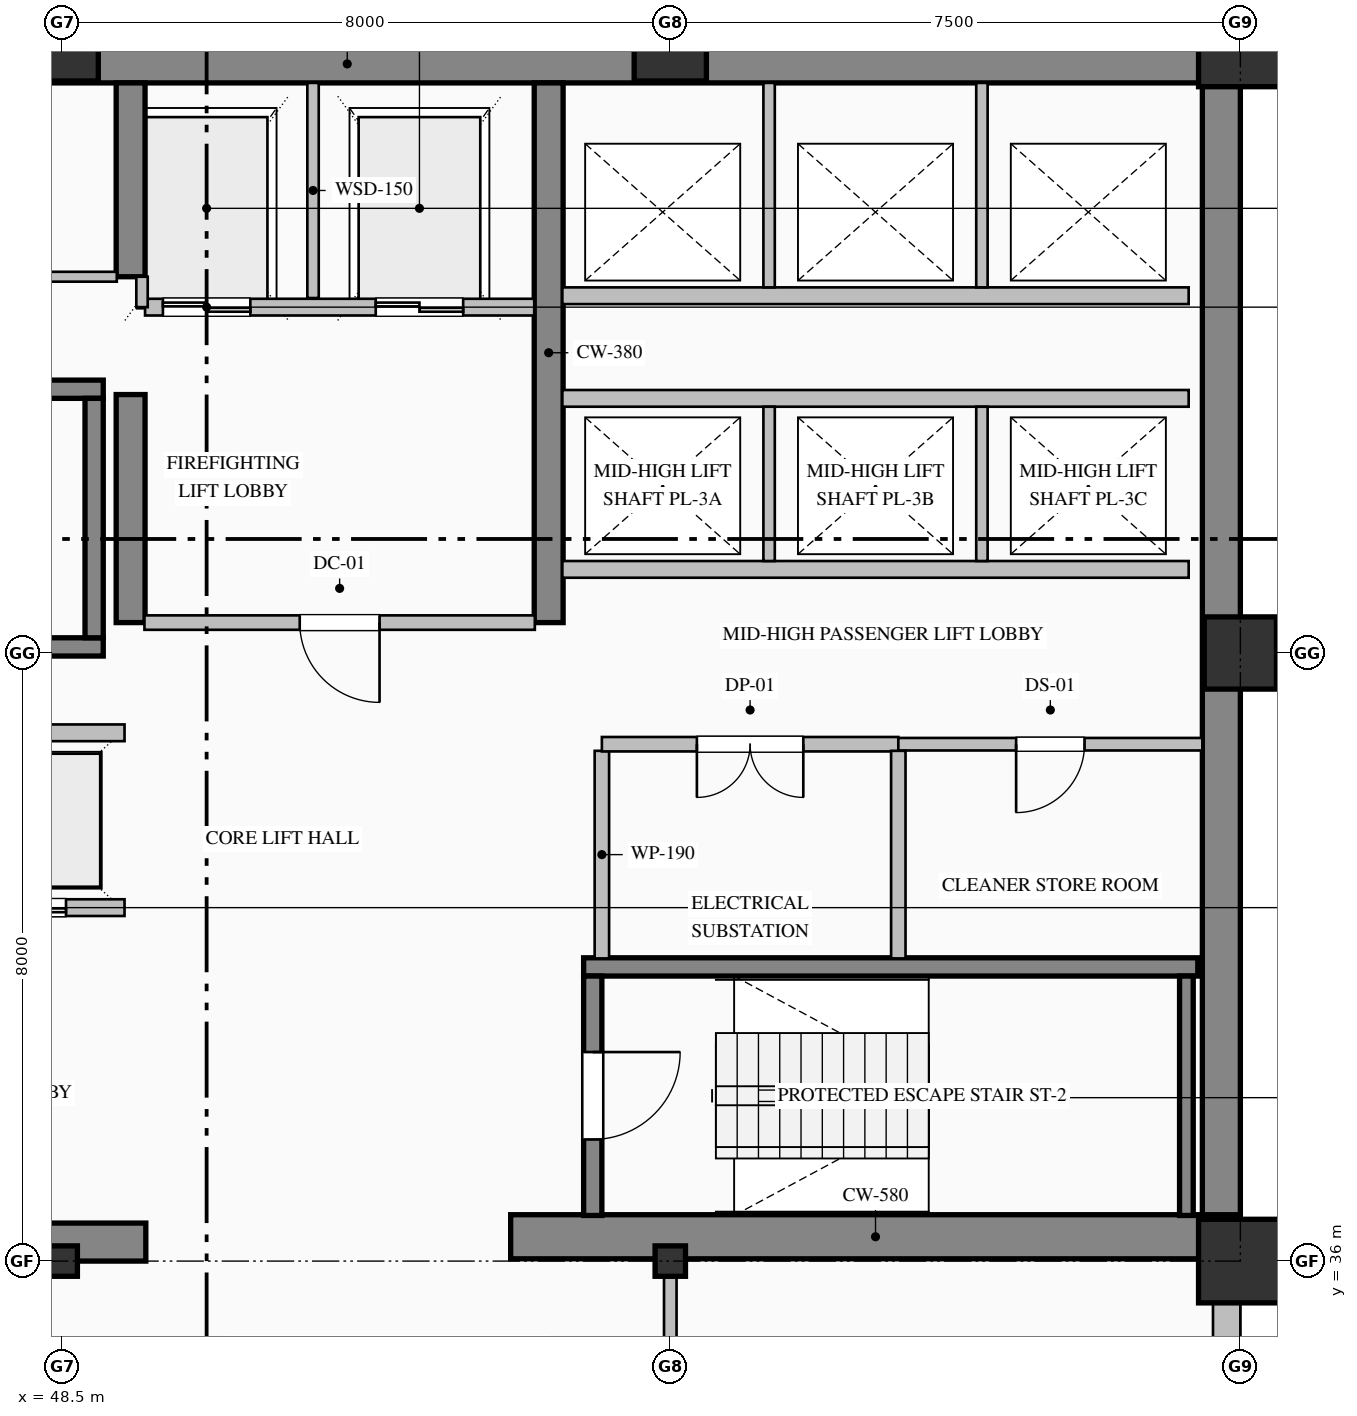
"""IFC4 building model, lengths in metres.
Left out: names, types, materials, properties, quantities, classifications, styles, units other than length and angle.
Written with IfcOpenShell. Run it as: python <this file> out.ifc"""

import sys

from ifc_helpers import new_model, si_unit, direction, frame, frame_2d, origin, origin_2d, place, context, subcontext, project, spatial, rectangle, hollow_rectangle, i_section, extrude, element, fill, save


model = new_model("IFC4")
c1 = context("Model", 3, precision=1e-05, world=origin(), true_north=direction((0.0, 1.0)))
c2 = subcontext(c1, "Body", "Model", "MODEL_VIEW")
j1 = project(units=[si_unit("LENGTHUNIT", "METRE"), si_unit("PLANEANGLEUNIT", "RADIAN")], contexts=[c1])
p1 = place(None, origin())
s1 = spatial("IfcSite", under=j1, at=p1, CompositionType="ELEMENT")
p2 = place(p1, origin())
s2 = spatial("IfcBuilding", under=s1, at=p2, CompositionType="ELEMENT")
p3 = place(p2, frame((0.0, 0.0, 151.0)))
s3 = spatial("IfcBuildingStorey", under=s2, at=p3, CompositionType="ELEMENT", Elevation=151.0)
p4 = place(p3, frame((40.5, 51.75, 0.0), z_axis=(0.0, 0.0, 1.0), x_axis=(1.0, 0.0, 0.0)))
e1 = element("IfcWall", 1, at=p4, inside=s3, PredefinedType="SHEAR", context=c2, shape_type="SweptSolid", body=[
    extrude(rectangle(XDim=23.5, YDim=0.5, at=frame_2d((11.75, 0.0))), origin(), (0.0, 0.0, 1.0), 3.765),
])
p5 = place(p3, frame((63.75, 36.32, 0.0), z_axis=(0.0, 0.0, 1.0), x_axis=(0.0, 1.0, 0.0)))
e2 = element("IfcWall", 2, at=p5, inside=s3, PredefinedType="SHEAR", context=c2, shape_type="SweptSolid", body=[
    extrude(rectangle(XDim=15.18, YDim=0.5, at=frame_2d((7.59, 0.0))), origin(), (0.0, 0.0, 1.0), 3.765),
])
p6 = place(p3, frame((40.5, 36.25, 0.0), z_axis=(0.0, 0.0, 1.0), x_axis=(1.0, 0.0, 0.0)))
e3 = element("IfcWall", 3, at=p6, inside=s3, PredefinedType="SHEAR", context=c2, shape_type="SweptSolid", body=[
    extrude(rectangle(XDim=9.1, YDim=0.5, at=frame_2d((4.55, 0.0))), origin(), (0.0, 0.0, 1.0), 3.765),
])
p7 = place(p3, frame((54.4, 36.32, 0.0), z_axis=(0.0, 0.0, 1.0), x_axis=(1.0, 0.0, 0.0)))
e4 = element("IfcWall", 4, at=p7, inside=s3, PredefinedType="SHEAR", context=c2, shape_type="SweptSolid", body=[
    extrude(rectangle(XDim=9.6, YDim=0.58, at=frame_2d((4.8, 0.0))), origin(), (0.0, 0.0, 1.0), 4.0),
])
p8 = place(p3, frame((49.4, 44.4, 0.0), z_axis=(0.0, 0.0, 1.0), x_axis=(0.0, 1.0, 0.0)))
e5 = element("IfcWall", 5, at=p8, inside=s3, PredefinedType="SHEAR", context=c2, shape_type="SweptSolid", body=[
    extrude(rectangle(XDim=3.0, YDim=0.38, at=frame_2d((1.5, 0.0))), origin(), (0.0, 0.0, 1.0), 3.765),
])
p9 = place(p3, frame((49.4, 48.95, 0.0), z_axis=(0.0, 0.0, 1.0), x_axis=(0.0, 1.0, 0.0)))
e6 = element("IfcWall", 6, at=p9, inside=s3, PredefinedType="SHEAR", context=c2, shape_type="SweptSolid", body=[
    extrude(rectangle(XDim=2.55, YDim=0.38, at=frame_2d((1.275, 0.0))), origin(), (0.0, 0.0, 1.0), 3.765),
])
p10 = place(p3, frame((54.9, 44.4, 0.0), z_axis=(0.0, 0.0, 1.0), x_axis=(0.0, 1.0, 0.0)))
e7 = element("IfcWall", 7, at=p10, inside=s3, PredefinedType="SHEAR", context=c2, shape_type="SweptSolid", body=[
    extrude(rectangle(XDim=7.1, YDim=0.38, at=frame_2d((3.55, 0.0))), origin(), (0.0, 0.0, 1.0), 3.765),
])
p11 = place(p3, frame((48.5, 36.0, 0.0), z_axis=(0.0, 0.0, 1.0), x_axis=(1.0, 0.0, 0.0)))
e8 = element("IfcColumn", 8, at=p11, inside=s3, PredefinedType="COLUMN", context=c2, shape_type="SweptSolid", body=[
    extrude(i_section(OverallWidth=0.4, OverallDepth=0.4, WebThickness=0.013, FlangeThickness=0.021, FilletRadius=0.022, at=origin_2d()), origin(), (0.0, 0.0, 1.0), 4.0),
])
p12 = place(p3, frame((48.5, 52.0, 0.0), z_axis=(0.0, 0.0, 1.0), x_axis=(1.0, 0.0, 0.0)))
e9 = element("IfcColumn", 9, at=p12, inside=s3, PredefinedType="COLUMN", context=c2, shape_type="SweptSolid", body=[
    extrude(hollow_rectangle(XDim=0.95, YDim=0.95, WallThickness=0.036, at=origin_2d()), origin(), (0.0, 0.0, 1.0), 4.0),
])
p13 = place(p3, frame((56.5, 36.0, 0.0), z_axis=(0.0, 0.0, 1.0), x_axis=(1.0, 0.0, 0.0)))
e10 = element("IfcColumn", 10, at=p13, inside=s3, PredefinedType="COLUMN", context=c2, shape_type="SweptSolid", body=[
    extrude(i_section(OverallWidth=0.4, OverallDepth=0.4, WebThickness=0.013, FlangeThickness=0.021, FilletRadius=0.022, at=origin_2d()), origin(), (0.0, 0.0, 1.0), 4.0),
])
p14 = place(p3, frame((56.5, 52.0, 0.0), z_axis=(0.0, 0.0, 1.0), x_axis=(1.0, 0.0, 0.0)))
e11 = element("IfcColumn", 11, at=p14, inside=s3, PredefinedType="COLUMN", context=c2, shape_type="SweptSolid", body=[
    extrude(hollow_rectangle(XDim=0.95, YDim=0.95, WallThickness=0.036, at=origin_2d()), origin(), (0.0, 0.0, 1.0), 4.0),
])
p15 = place(p3, frame((64.0, 36.0, 0.0), z_axis=(0.0, 0.0, 1.0), x_axis=(1.0, 0.0, 0.0)))
e12 = element("IfcColumn", 12, at=p15, inside=s3, PredefinedType="COLUMN", context=c2, shape_type="SweptSolid", body=[
    extrude(hollow_rectangle(XDim=1.1, YDim=1.1, WallThickness=0.04, at=origin_2d()), origin(), (0.0, 0.0, 1.0), 4.0),
])
p16 = place(p3, frame((64.0, 44.0, 0.0), z_axis=(0.0, 0.0, 1.0), x_axis=(1.0, 0.0, 0.0)))
e13 = element("IfcColumn", 13, at=p16, inside=s3, PredefinedType="COLUMN", context=c2, shape_type="SweptSolid", body=[
    extrude(hollow_rectangle(XDim=0.95, YDim=0.95, WallThickness=0.036, at=origin_2d()), origin(), (0.0, 0.0, 1.0), 4.0),
])
p17 = place(p3, frame((64.0, 52.0, 0.0), z_axis=(0.0, 0.0, 1.0), x_axis=(1.0, 0.0, 0.0)))
e14 = element("IfcColumn", 14, at=p17, inside=s3, PredefinedType="COLUMN", context=c2, shape_type="SweptSolid", body=[
    extrude(hollow_rectangle(XDim=1.1, YDim=1.1, WallThickness=0.04, at=origin_2d()), origin(), (0.0, 0.0, 1.0), 4.0),
])
p18 = place(p3, frame((63.82, 36.05, 0.0), z_axis=(0.0, 0.0, 1.0), x_axis=(0.0, -1.0, 0.0)))
e15 = element("IfcWall", 15, at=p18, inside=s3, PredefinedType="SOLIDWALL", context=c2, shape_type="SweptSolid", body=[
    extrude(rectangle(XDim=28.05, YDim=0.36, at=frame_2d((14.025, 0.0))), origin(), (0.0, 0.0, 1.0), 3.265),
])
p19 = place(p18, frame((2.85, 0.0, 0.85)))
e16 = element("IfcOpeningElement", 16, at=p19, cuts=e15, PredefinedType="OPENING", context=c2, shape_type="SweptSolid", body=[
    extrude(rectangle(XDim=1.5, YDim=1.95, at=frame_2d((0.75, 0.975))), frame((0.0, 0.19, 0.0), z_axis=(0.0, -1.0, 0.0), x_axis=(1.0, 0.0, 0.0)), (0.0, 0.0, 1.0), 0.38),
])
p20 = place(p18, frame((10.2, 0.0, 0.7)))
e17 = element("IfcOpeningElement", 17, at=p20, cuts=e15, PredefinedType="OPENING", context=c2, shape_type="SweptSolid", body=[
    extrude(rectangle(XDim=1.2, YDim=1.85, at=frame_2d((0.6, 0.925))), frame((0.0, 0.19, 0.0), z_axis=(0.0, -1.0, 0.0), x_axis=(1.0, 0.0, 0.0)), (0.0, 0.0, 1.0), 0.38),
])
p21 = place(p18, frame((24.45, 0.0, 0.85)))
e18 = element("IfcOpeningElement", 18, at=p21, cuts=e15, PredefinedType="OPENING", context=c2, shape_type="SweptSolid", body=[
    extrude(rectangle(XDim=1.5, YDim=1.95, at=frame_2d((0.75, 0.975))), frame((0.0, 0.19, 0.0), z_axis=(0.0, -1.0, 0.0), x_axis=(1.0, 0.0, 0.0)), (0.0, 0.0, 1.0), 0.38),
])
for number, where, z_axis, x_axis in (
    (19, (40.96, 47.47, 0.0), (0.0, 0.0, 1.0), (1.0, 0.0, 0.0)),
    (20, (49.04, 44.08, 0.0), (0.0, 0.0, 1.0), (-1.0, 0.0, 0.0)),
):
    element("IfcWall", number, at=place(p3, frame(where, z_axis=z_axis, x_axis=x_axis)), inside=s3, PredefinedType="SOLIDWALL", context=c2, shape_type="SweptSolid", body=[
        extrude(rectangle(XDim=8.08, YDim=0.24, at=frame_2d((4.04, 0.0))), origin(), (0.0, 0.0, 1.0), 4.0),
    ])
p22 = place(p3, frame((48.92, 44.2, 0.0), z_axis=(0.0, 0.0, 1.0), x_axis=(0.0, 1.0, 0.0)))
e21 = element("IfcWall", 21, at=p22, inside=s3, PredefinedType="SOLIDWALL", context=c2, shape_type="SweptSolid", body=[
    extrude(rectangle(XDim=3.15, YDim=0.24, at=frame_2d((1.575, 0.0))), origin(), (0.0, 0.0, 1.0), 4.0),
])
p23 = place(p3, frame((55.36, 39.87, 0.0), z_axis=(0.0, 0.0, 1.0), x_axis=(1.0, 0.0, 0.0)))
e22 = element("IfcWall", 22, at=p23, inside=s3, PredefinedType="SOLIDWALL", context=c2, shape_type="SweptSolid", body=[
    extrude(rectangle(XDim=8.08, YDim=0.24, at=frame_2d((4.04, 0.0))), origin(), (0.0, 0.0, 1.0), 4.0),
])
p24 = place(p3, frame((55.48, 39.75, 0.0), z_axis=(0.0, 0.0, 1.0), x_axis=(0.0, -1.0, 0.0)))
e23 = element("IfcWall", 23, at=p24, inside=s3, PredefinedType="SOLIDWALL", context=c2, shape_type="SweptSolid", body=[
    extrude(rectangle(XDim=3.15, YDim=0.24, at=frame_2d((1.575, 0.0))), origin(), (0.0, 0.0, 1.0), 4.0),
])
p25 = place(p24, frame((1.0, 0.0, 0.0)))
e24 = element("IfcOpeningElement", 24, at=p25, cuts=e23, PredefinedType="OPENING", context=c2, shape_type="SweptSolid", body=[
    extrude(rectangle(XDim=1.15, YDim=2.2, at=frame_2d((0.575, 1.1))), frame((0.0, 0.13, 0.0), z_axis=(0.0, -1.0, 0.0), x_axis=(1.0, 0.0, 0.0)), (0.0, 0.0, 1.0), 0.26),
])
p26 = place(p3, frame((63.29, 36.6, 0.0), z_axis=(0.0, 0.0, 1.0), x_axis=(0.0, 1.0, 0.0)))
e25 = element("IfcWall", 25, at=p26, inside=s3, PredefinedType="SOLIDWALL", context=c2, shape_type="SweptSolid", body=[
    extrude(rectangle(XDim=3.15, YDim=0.18, at=frame_2d((1.575, 0.0))), origin(), (0.0, 0.0, 1.0), 4.0),
])
p27 = place(p3, frame((54.71, 48.55, 0.0), z_axis=(0.0, 0.0, 1.0), x_axis=(-1.0, 0.0, 0.0)))
e26 = element("IfcWall", 26, at=p27, inside=s3, PredefinedType="PARTITIONING", context=c2, shape_type="SweptSolid", body=[
    extrude(rectangle(XDim=5.12, YDim=0.22, at=frame_2d((2.56, 0.0))), origin(), (0.0, 0.0, 1.0), 3.765),
])
p28 = place(p27, frame((3.735, 0.0, 0.0)))
e27 = element("IfcOpeningElement", 27, at=p28, cuts=e26, PredefinedType="OPENING", context=c2, shape_type="SweptSolid", body=[
    extrude(rectangle(XDim=1.15, YDim=2.2, at=frame_2d((0.575, 1.1))), frame((0.0, 0.12, 0.0), z_axis=(0.0, -1.0, 0.0), x_axis=(1.0, 0.0, 0.0)), (0.0, 0.0, 1.0), 0.24),
])
p29 = place(p27, frame((0.935, 0.0, 0.0)))
e28 = element("IfcOpeningElement", 28, at=p29, cuts=e26, PredefinedType="OPENING", context=c2, shape_type="SweptSolid", body=[
    extrude(rectangle(XDim=1.15, YDim=2.2, at=frame_2d((0.575, 1.1))), frame((0.0, 0.12, 0.0), z_axis=(0.0, -1.0, 0.0), x_axis=(1.0, 0.0, 0.0)), (0.0, 0.0, 1.0), 0.24),
])
p30 = place(p3, frame((51.8, 48.67, 0.0), z_axis=(0.0, 0.0, 1.0), x_axis=(0.0, 1.0, 0.0)))
e29 = element("IfcWall", 29, at=p30, inside=s3, PredefinedType="PARTITIONING", context=c2, shape_type="SweptSolid", body=[
    extrude(rectangle(XDim=2.83, YDim=0.15, at=frame_2d((1.415, 0.0))), origin(), (0.0, 0.0, 1.0), 3.765),
])
p31 = place(p3, frame((49.55, 48.55, 0.0), z_axis=(0.0, 0.0, 1.0), x_axis=(0.0, 1.0, 0.0)))
e30 = element("IfcWall", 30, at=p31, inside=s3, PredefinedType="PARTITIONING", context=c2, shape_type="SweptSolid", body=[
    extrude(rectangle(XDim=0.4, YDim=0.15, at=frame_2d((0.2, 0.0))), origin(), (0.0, 0.0, 1.0), 3.765),
])
p32 = place(p3, frame((49.32, 40.65, 0.0), z_axis=(0.0, 0.0, 1.0), x_axis=(-1.0, 0.0, 0.0)))
e31 = element("IfcWall", 31, at=p32, inside=s3, PredefinedType="PARTITIONING", context=c2, shape_type="SweptSolid", body=[
    extrude(rectangle(XDim=8.24, YDim=0.22, at=frame_2d((4.12, 0.0))), origin(), (0.0, 0.0, 1.0), 3.765),
])
p33 = place(p32, frame((6.37, 0.0, 0.0)))
e32 = element("IfcOpeningElement", 32, at=p33, cuts=e31, PredefinedType="OPENING", context=c2, shape_type="SweptSolid", body=[
    extrude(rectangle(XDim=1.1, YDim=2.2, at=frame_2d((0.55, 1.1))), frame((0.0, 0.12, 0.0), z_axis=(0.0, -1.0, 0.0), x_axis=(1.0, 0.0, 0.0)), (0.0, 0.0, 1.0), 0.24),
])
p34 = place(p32, frame((3.57, 0.0, 0.0)))
e33 = element("IfcOpeningElement", 33, at=p34, cuts=e31, PredefinedType="OPENING", context=c2, shape_type="SweptSolid", body=[
    extrude(rectangle(XDim=1.1, YDim=2.2, at=frame_2d((0.55, 1.1))), frame((0.0, 0.12, 0.0), z_axis=(0.0, -1.0, 0.0), x_axis=(1.0, 0.0, 0.0)), (0.0, 0.0, 1.0), 0.24),
])
p35 = place(p32, frame((0.77, 0.0, 0.0)))
e34 = element("IfcOpeningElement", 34, at=p35, cuts=e31, PredefinedType="OPENING", context=c2, shape_type="SweptSolid", body=[
    extrude(rectangle(XDim=1.1, YDim=2.2, at=frame_2d((0.55, 1.1))), frame((0.0, 0.12, 0.0), z_axis=(0.0, -1.0, 0.0), x_axis=(1.0, 0.0, 0.0)), (0.0, 0.0, 1.0), 0.24),
])
for number, where, z_axis, x_axis in (
    (35, (41.08, 42.95, 0.0), (0.0, 0.0, 1.0), (1.0, 0.0, 0.0)),
    (36, (63.32, 45.1, 0.0), (0.0, 0.0, 1.0), (-1.0, 0.0, 0.0)),
    (37, (55.08, 47.35, 0.0), (0.0, 0.0, 1.0), (1.0, 0.0, 0.0)),
):
    element("IfcWall", number, at=place(p3, frame(where, z_axis=z_axis, x_axis=x_axis)), inside=s3, PredefinedType="PARTITIONING", context=c2, shape_type="SweptSolid", body=[
        extrude(rectangle(XDim=8.24, YDim=0.22, at=frame_2d((4.12, 0.0))), origin(), (0.0, 0.0, 1.0), 3.765),
    ])
for number, where, z_axis, x_axis in (
    (38, (57.8, 45.21, 0.0), (0.0, 0.0, 1.0), (0.0, 1.0, 0.0)),
    (39, (60.6, 45.21, 0.0), (0.0, 0.0, 1.0), (0.0, 1.0, 0.0)),
):
    element("IfcWall", number, at=place(p3, frame(where, z_axis=z_axis, x_axis=x_axis)), inside=s3, PredefinedType="PARTITIONING", context=c2, shape_type="SweptSolid", body=[
        extrude(rectangle(XDim=2.03, YDim=0.15, at=frame_2d((1.015, 0.0))), origin(), (0.0, 0.0, 1.0), 3.765),
    ])
p36 = place(p3, frame((63.32, 48.7, 0.0), z_axis=(0.0, 0.0, 1.0), x_axis=(-1.0, 0.0, 0.0)))
e40 = element("IfcWall", 40, at=p36, inside=s3, PredefinedType="PARTITIONING", context=c2, shape_type="SweptSolid", body=[
    extrude(rectangle(XDim=8.24, YDim=0.22, at=frame_2d((4.12, 0.0))), origin(), (0.0, 0.0, 1.0), 3.765),
])
for number, where, z_axis, x_axis in (
    (41, (57.8, 48.81, 0.0), (0.0, 0.0, 1.0), (0.0, 1.0, 0.0)),
    (42, (60.6, 48.81, 0.0), (0.0, 0.0, 1.0), (0.0, 1.0, 0.0)),
):
    element("IfcWall", number, at=place(p3, frame(where, z_axis=z_axis, x_axis=x_axis)), inside=s3, PredefinedType="PARTITIONING", context=c2, shape_type="SweptSolid", body=[
        extrude(rectangle(XDim=2.69, YDim=0.15, at=frame_2d((1.345, 0.0))), origin(), (0.0, 0.0, 1.0), 3.765),
    ])
p37 = place(p3, frame((45.2, 48.95, 0.0), z_axis=(0.0, 0.0, 1.0), x_axis=(1.0, 0.0, 0.0)))
e43 = element("IfcWall", 43, at=p37, inside=s3, PredefinedType="PARTITIONING", context=c2, shape_type="SweptSolid", body=[
    extrude(rectangle(XDim=4.018, YDim=0.13, at=frame_2d((2.009, 0.0))), origin(), (0.0, 0.0, 1.0), 3.765),
])
p38 = place(p37, frame((1.549, 0.0, 0.0)))
e44 = element("IfcOpeningElement", 44, at=p38, cuts=e43, PredefinedType="OPENING", context=c2, shape_type="SweptSolid", body=[
    extrude(rectangle(XDim=0.92, YDim=2.15, at=frame_2d((0.46, 1.075))), frame((0.0, 0.075, 0.0), z_axis=(0.0, -1.0, 0.0), x_axis=(1.0, 0.0, 0.0)), (0.0, 0.0, 1.0), 0.15),
])
p39 = place(p3, frame((54.718, 44.4, 0.0), z_axis=(0.0, 0.0, 1.0), x_axis=(-1.0, 0.0, 0.0)))
e45 = element("IfcWall", 45, at=p39, inside=s3, PredefinedType="PARTITIONING", context=c2, shape_type="SweptSolid", body=[
    extrude(rectangle(XDim=5.136, YDim=0.19, at=frame_2d((2.568, 0.0))), origin(), (0.0, 0.0, 1.0), 3.765),
])
p40 = place(p39, frame((2.043, 0.0, 0.0)))
e46 = element("IfcOpeningElement", 46, at=p40, cuts=e45, PredefinedType="OPENING", context=c2, shape_type="SweptSolid", body=[
    extrude(rectangle(XDim=1.05, YDim=2.15, at=frame_2d((0.525, 1.075))), frame((0.0, 0.105, 0.0), z_axis=(0.0, -1.0, 0.0), x_axis=(1.0, 0.0, 0.0)), (0.0, 0.0, 1.0), 0.21),
])
p41 = place(p3, frame((55.6, 42.713, 0.0), z_axis=(0.0, 0.0, 1.0), x_axis=(0.0, -1.0, 0.0)))
e47 = element("IfcWall", 47, at=p41, inside=s3, PredefinedType="PARTITIONING", context=c2, shape_type="SweptSolid", body=[
    extrude(rectangle(XDim=2.731, YDim=0.19, at=frame_2d((1.365, 0.0))), origin(), (0.0, 0.0, 1.0), 3.765),
])
p42 = place(p3, frame((59.5, 42.8, 0.0), z_axis=(0.0, 0.0, 1.0), x_axis=(-1.0, 0.0, 0.0)))
e48 = element("IfcWall", 48, at=p42, inside=s3, PredefinedType="PARTITIONING", context=c2, shape_type="SweptSolid", body=[
    extrude(rectangle(XDim=3.9, YDim=0.19, at=frame_2d((1.95, 0.0))), origin(), (0.0, 0.0, 1.0), 3.765),
])
p43 = place(p42, frame((1.25, 0.0, 0.0)))
e49 = element("IfcOpeningElement", 49, at=p43, cuts=e48, PredefinedType="OPENING", context=c2, shape_type="SweptSolid", body=[
    extrude(rectangle(XDim=1.4, YDim=2.25, at=frame_2d((0.7, 1.125))), frame((0.0, 0.105, 0.0), z_axis=(0.0, -1.0, 0.0), x_axis=(1.0, 0.0, 0.0)), (0.0, 0.0, 1.0), 0.21),
])
p44 = place(p3, frame((63.5, 42.8, 0.0), z_axis=(0.0, 0.0, 1.0), x_axis=(-1.0, 0.0, 0.0)))
e50 = element("IfcWall", 50, at=p44, inside=s3, PredefinedType="PARTITIONING", context=c2, shape_type="SweptSolid", body=[
    extrude(rectangle(XDim=4.0, YDim=0.165, at=frame_2d((2.0, 0.0))), origin(), (0.0, 0.0, 1.0), 3.765),
])
p45 = place(p44, frame((1.55, 0.0, 0.0)))
e51 = element("IfcOpeningElement", 51, at=p45, cuts=e50, PredefinedType="OPENING", context=c2, shape_type="SweptSolid", body=[
    extrude(rectangle(XDim=0.9, YDim=2.15, at=frame_2d((0.45, 1.075))), frame((0.0, 0.093, 0.0), z_axis=(0.0, -1.0, 0.0), x_axis=(1.0, 0.0, 0.0)), (0.0, 0.0, 1.0), 0.185),
])
p46 = place(p3, frame((59.5, 42.713, 0.0), z_axis=(0.0, 0.0, 1.0), x_axis=(0.0, -1.0, 0.0)))
e52 = element("IfcWall", 52, at=p46, inside=s3, PredefinedType="PARTITIONING", context=c2, shape_type="SweptSolid", body=[
    extrude(rectangle(XDim=2.731, YDim=0.19, at=frame_2d((1.365, 0.0))), origin(), (0.0, 0.0, 1.0), 3.765),
])
p47 = place(p3, frame((56.5, 36.0, 0.0), z_axis=(0.0, 0.0, 1.0), x_axis=(0.0, -1.0, 0.0)))
e53 = element("IfcWall", 53, at=p47, inside=s3, PredefinedType="PARTITIONING", context=c2, shape_type="SweptSolid", body=[
    extrude(rectangle(XDim=2.325, YDim=0.165, at=frame_2d((1.163, 0.0))), origin(), (0.0, 0.0, 1.0), 3.157),
])
p48 = place(p25, origin())
e54 = element("IfcDoor", 54, at=p48, inside=s3, OperationType="SINGLE_SWING_LEFT", PredefinedType="DOOR", context=c2, shape_type="SweptSolid", body=[
    extrude(rectangle(XDim=1.15, YDim=2.2, at=frame_2d((0.575, 1.1))), frame((0.0, 0.025, 0.0), z_axis=(0.0, -1.0, 0.0), x_axis=(1.0, 0.0, 0.0)), (0.0, 0.0, 1.0), 0.05),
])
fill(e24, e54)
p49 = place(p28, origin())
e55 = element("IfcDoor", 55, at=p49, inside=s3, OperationType="DOUBLE_DOOR_SLIDING", PredefinedType="DOOR", context=c2, shape_type="SweptSolid", body=[
    extrude(rectangle(XDim=1.15, YDim=2.2, at=frame_2d((0.575, 1.1))), frame((0.0, 0.025, 0.0), z_axis=(0.0, -1.0, 0.0), x_axis=(1.0, 0.0, 0.0)), (0.0, 0.0, 1.0), 0.05),
])
fill(e27, e55)
p50 = place(p29, origin())
e56 = element("IfcDoor", 56, at=p50, inside=s3, OperationType="DOUBLE_DOOR_SLIDING", PredefinedType="DOOR", context=c2, shape_type="SweptSolid", body=[
    extrude(rectangle(XDim=1.15, YDim=2.2, at=frame_2d((0.575, 1.1))), frame((0.0, 0.025, 0.0), z_axis=(0.0, -1.0, 0.0), x_axis=(1.0, 0.0, 0.0)), (0.0, 0.0, 1.0), 0.05),
])
fill(e28, e56)
p51 = place(p35, origin())
e57 = element("IfcDoor", 57, at=p51, inside=s3, OperationType="DOUBLE_DOOR_SLIDING", PredefinedType="DOOR", context=c2, shape_type="SweptSolid", body=[
    extrude(rectangle(XDim=1.1, YDim=2.2, at=frame_2d((0.55, 1.1))), frame((0.0, 0.025, 0.0), z_axis=(0.0, -1.0, 0.0), x_axis=(1.0, 0.0, 0.0)), (0.0, 0.0, 1.0), 0.05),
])
fill(e34, e57)
p52 = place(p40, origin())
e58 = element("IfcDoor", 58, at=p52, inside=s3, OperationType="SINGLE_SWING_LEFT", PredefinedType="DOOR", context=c2, shape_type="SweptSolid", body=[
    extrude(rectangle(XDim=1.05, YDim=2.15, at=frame_2d((0.525, 1.075))), frame((0.0, 0.025, 0.0), z_axis=(0.0, -1.0, 0.0), x_axis=(1.0, 0.0, 0.0)), (0.0, 0.0, 1.0), 0.05),
])
fill(e46, e58)
p53 = place(p43, origin())
e59 = element("IfcDoor", 59, at=p53, inside=s3, OperationType="DOUBLE_DOOR_SINGLE_SWING", PredefinedType="DOOR", context=c2, shape_type="SweptSolid", body=[
    extrude(rectangle(XDim=1.4, YDim=2.25, at=frame_2d((0.7, 1.125))), frame((0.0, 0.025, 0.0), z_axis=(0.0, -1.0, 0.0), x_axis=(1.0, 0.0, 0.0)), (0.0, 0.0, 1.0), 0.05),
])
fill(e49, e59)
p54 = place(p45, origin())
e60 = element("IfcDoor", 60, at=p54, inside=s3, OperationType="SINGLE_SWING_RIGHT", PredefinedType="DOOR", context=c2, shape_type="SweptSolid", body=[
    extrude(rectangle(XDim=0.9, YDim=2.15, at=frame_2d((0.45, 1.075))), frame((0.0, 0.025, 0.0), z_axis=(0.0, -1.0, 0.0), x_axis=(1.0, 0.0, 0.0)), (0.0, 0.0, 1.0), 0.05),
])
fill(e51, e60)
save(model, sys.argv[1])
